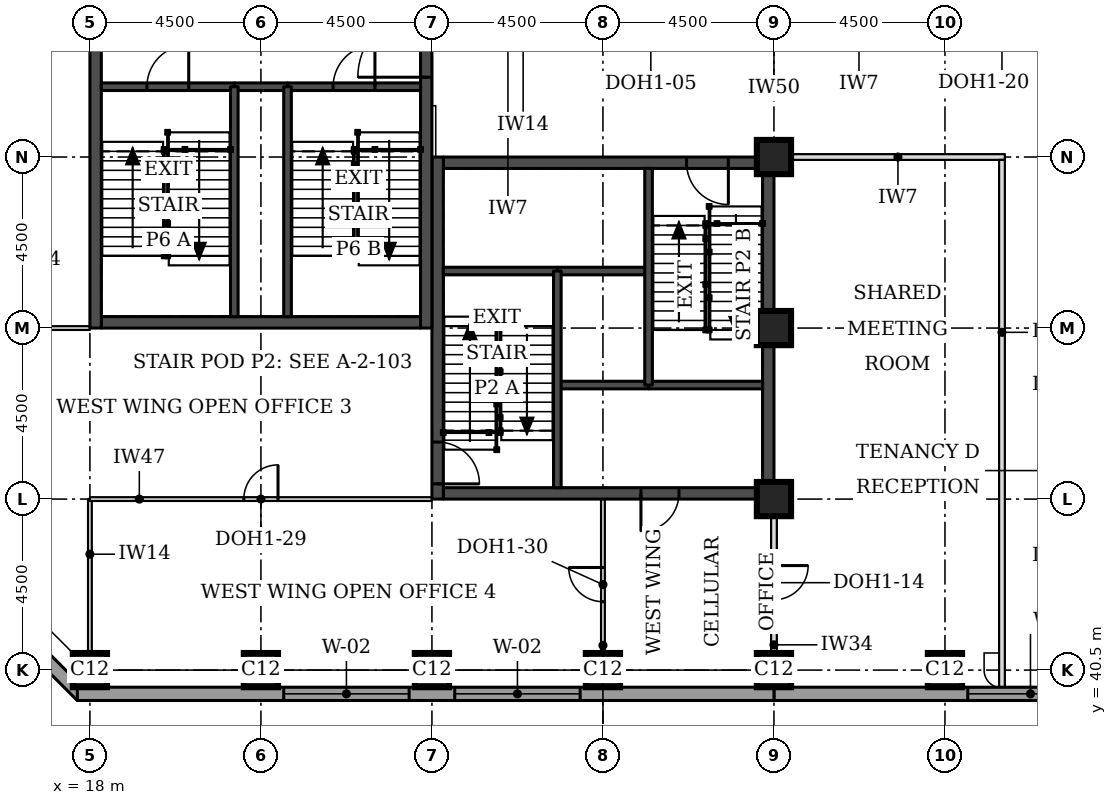
"""IFC4 building model, lengths in metres.
Left out: names, types, materials, properties, quantities, classifications, styles, units other than length and angle.
Written with IfcOpenShell. Run it as: python <this file> out.ifc"""

import sys

from ifc_helpers import new_model, si_unit, direction, frame, frame_2d, origin, origin_2d, place, context, subcontext, project, spatial, rectangle, extrude, element, fill, save


model = new_model("IFC4")
c1 = context("Model", 3, precision=1e-05, world=origin(), true_north=direction((0.0, 1.0)))
c2 = subcontext(c1, "Body", "Model", "MODEL_VIEW")
j1 = project(units=[si_unit("LENGTHUNIT", "METRE"), si_unit("PLANEANGLEUNIT", "RADIAN")], contexts=[c1])
p1 = place(None, origin())
s1 = spatial("IfcSite", under=j1, at=p1, CompositionType="ELEMENT")
p2 = place(p1, origin())
s2 = spatial("IfcBuilding", under=s1, at=p2, CompositionType="ELEMENT")
p3 = place(p2, frame((0.0, 0.0, 147.7)))
s3 = spatial("IfcBuildingStorey", under=s2, at=p3, CompositionType="ELEMENT", Elevation=147.7)
for number, where, z_axis, x_axis in (
    (1, (18.0, 40.5, 0.0), (0.0, 0.0, 1.0), (1.0, 0.0, 0.0)),
    (2, (22.5, 40.5, 0.0), (0.0, 0.0, 1.0), (1.0, 0.0, 0.0)),
    (3, (27.0, 40.5, 0.0), (0.0, 0.0, 1.0), (1.0, 0.0, 0.0)),
    (4, (31.5, 40.5, 0.0), (0.0, 0.0, 1.0), (1.0, 0.0, 0.0)),
    (5, (36.0, 40.5, 0.0), (0.0, 0.0, 1.0), (1.0, 0.0, 0.0)),
    (6, (40.5, 40.5, 0.0), (0.0, 0.0, 1.0), (1.0, 0.0, 0.0)),
    (7, (36.0, 45.0, 0.0), (0.0, 0.0, 1.0), (1.0, 0.0, 0.0)),
    (8, (36.0, 49.5, 0.0), (0.0, 0.0, 1.0), (1.0, 0.0, 0.0)),
    (9, (36.0, 54.0, 0.0), (0.0, 0.0, 1.0), (1.0, 0.0, 0.0)),
):
    element("IfcColumn", number, at=place(p3, frame(where, z_axis=z_axis, x_axis=x_axis)), inside=s3, PredefinedType="COLUMN", context=c2, shape_type="SweptSolid", body=[
        extrude(rectangle(XDim=0.9, YDim=0.9, at=origin_2d()), origin(), (0.0, 0.0, 1.0), 3.7),
    ])
p4 = place(p3, frame((27.3, 45.15, 0.0), z_axis=(0.0, 0.0, 1.0), x_axis=(1.0, 0.0, 0.0)))
e10 = element("IfcWall", 10, at=p4, inside=s3, PredefinedType="SHEAR", context=c2, shape_type="SweptSolid", body=[
    extrude(rectangle(XDim=8.4, YDim=0.3, at=frame_2d((4.2, 0.0))), origin(), (0.0, 0.0, 1.0), 3.7),
])
p5 = place(p4, frame((5.2, 0.0, 0.0)))
e11 = element("IfcOpeningElement", 11, at=p5, cuts=e10, PredefinedType="OPENING", context=c2, shape_type="SweptSolid", body=[
    extrude(rectangle(XDim=1.0, YDim=2.1, at=frame_2d((0.5, 1.05))), frame((0.0, 0.16, 0.0), z_axis=(0.0, -1.0, 0.0), x_axis=(1.0, 0.0, 0.0)), (0.0, 0.0, 1.0), 0.32),
])
p6 = place(p3, frame((27.3, 53.85, 0.0), z_axis=(0.0, 0.0, 1.0), x_axis=(1.0, 0.0, 0.0)))
e12 = element("IfcWall", 12, at=p6, inside=s3, PredefinedType="SHEAR", context=c2, shape_type="SweptSolid", body=[
    extrude(rectangle(XDim=8.4, YDim=0.3, at=frame_2d((4.2, 0.0))), origin(), (0.0, 0.0, 1.0), 3.7),
])
p7 = place(p6, frame((6.4, 0.0, 0.0)))
e13 = element("IfcOpeningElement", 13, at=p7, cuts=e12, PredefinedType="OPENING", context=c2, shape_type="SweptSolid", body=[
    extrude(rectangle(XDim=1.1, YDim=2.1, at=frame_2d((0.55, 1.05))), frame((0.0, 0.16, 0.0), z_axis=(0.0, -1.0, 0.0), x_axis=(1.0, 0.0, 0.0)), (0.0, 0.0, 1.0), 0.32),
])
p8 = place(p3, frame((27.15, 45.0, 0.0), z_axis=(0.0, 0.0, 1.0), x_axis=(0.0, 1.0, 0.0)))
e14 = element("IfcWall", 14, at=p8, inside=s3, PredefinedType="SHEAR", context=c2, shape_type="SweptSolid", body=[
    extrude(rectangle(XDim=9.0, YDim=0.3, at=frame_2d((4.5, 0.0))), origin(), (0.0, 0.0, 1.0), 3.7),
])
p9 = place(p8, frame((0.4, 0.0, 0.0)))
e15 = element("IfcOpeningElement", 15, at=p9, cuts=e14, PredefinedType="OPENING", context=c2, shape_type="SweptSolid", body=[
    extrude(rectangle(XDim=1.1, YDim=2.1, at=frame_2d((0.55, 1.05))), frame((0.0, 0.16, 0.0), z_axis=(0.0, -1.0, 0.0), x_axis=(1.0, 0.0, 0.0)), (0.0, 0.0, 1.0), 0.32),
])
p10 = place(p3, frame((35.85, 45.0, 0.0), z_axis=(0.0, 0.0, 1.0), x_axis=(0.0, 1.0, 0.0)))
e16 = element("IfcWall", 16, at=p10, inside=s3, PredefinedType="SHEAR", context=c2, shape_type="SweptSolid", body=[
    extrude(rectangle(XDim=9.0, YDim=0.3, at=frame_2d((4.5, 0.0))), origin(), (0.0, 0.0, 1.0), 3.7),
])
p11 = place(p3, frame((18.3, 49.65, 0.0), z_axis=(0.0, 0.0, 1.0), x_axis=(1.0, 0.0, 0.0)))
e17 = element("IfcWall", 17, at=p11, inside=s3, PredefinedType="SHEAR", context=c2, shape_type="SweptSolid", body=[
    extrude(rectangle(XDim=8.4, YDim=0.3, at=frame_2d((4.2, 0.0))), origin(), (0.0, 0.0, 1.0), 3.7),
])
p12 = place(p3, frame((18.15, 49.5, 0.0), z_axis=(0.0, 0.0, 1.0), x_axis=(0.0, 1.0, 0.0)))
e18 = element("IfcWall", 18, at=p12, inside=s3, PredefinedType="SHEAR", context=c2, shape_type="SweptSolid", body=[
    extrude(rectangle(XDim=9.0, YDim=0.3, at=frame_2d((4.5, 0.0))), origin(), (0.0, 0.0, 1.0), 3.7),
])
p13 = place(p3, frame((26.85, 49.5, 0.0), z_axis=(0.0, 0.0, 1.0), x_axis=(0.0, 1.0, 0.0)))
e19 = element("IfcWall", 19, at=p13, inside=s3, PredefinedType="SHEAR", context=c2, shape_type="SweptSolid", body=[
    extrude(rectangle(XDim=9.0, YDim=0.3, at=frame_2d((4.5, 0.0))), origin(), (0.0, 0.0, 1.0), 3.7),
])
p14 = place(p13, frame((6.6, 0.0, 0.0)))
e20 = element("IfcOpeningElement", 20, at=p14, cuts=e19, PredefinedType="OPENING", context=c2, shape_type="SweptSolid", body=[
    extrude(rectangle(XDim=1.8, YDim=2.1, at=frame_2d((0.9, 1.05))), frame((0.0, 0.16, 0.0), z_axis=(0.0, -1.0, 0.0), x_axis=(1.0, 0.0, 0.0)), (0.0, 0.0, 1.0), 0.32),
])
p15 = place(p3, frame((36.0, 39.875, 0.0), z_axis=(0.0, 0.0, 1.0), x_axis=(1.0, 0.0, 0.0)))
e21 = element("IfcWall", 21, at=p15, inside=s3, PredefinedType="STANDARD", context=c2, shape_type="SweptSolid", body=[
    extrude(rectangle(XDim=36.331, YDim=0.35, at=frame_2d((18.166, 0.0))), origin(), (0.0, 0.0, 1.0), 3.525),
])
p16 = place(p15, frame((5.1, 0.0, 0.9)))
e22 = element("IfcOpeningElement", 22, at=p16, cuts=e21, PredefinedType="OPENING", context=c2, shape_type="SweptSolid", body=[
    extrude(rectangle(XDim=3.3, YDim=1.9, at=frame_2d((1.65, 0.95))), frame((0.0, 0.185, 0.0), z_axis=(0.0, -1.0, 0.0), x_axis=(1.0, 0.0, 0.0)), (0.0, 0.0, 1.0), 0.37),
])
p17 = place(p15, frame((9.6, 0.0, 0.9)))
e23 = element("IfcOpeningElement", 23, at=p17, cuts=e21, PredefinedType="OPENING", context=c2, shape_type="SweptSolid", body=[
    extrude(rectangle(XDim=3.3, YDim=1.9, at=frame_2d((1.65, 0.95))), frame((0.0, 0.185, 0.0), z_axis=(0.0, -1.0, 0.0), x_axis=(1.0, 0.0, 0.0)), (0.0, 0.0, 1.0), 0.37),
])
p18 = place(p15, frame((14.1, 0.0, 0.9)))
e24 = element("IfcOpeningElement", 24, at=p18, cuts=e21, PredefinedType="OPENING", context=c2, shape_type="SweptSolid", body=[
    extrude(rectangle(XDim=3.3, YDim=1.9, at=frame_2d((1.65, 0.95))), frame((0.0, 0.185, 0.0), z_axis=(0.0, -1.0, 0.0), x_axis=(1.0, 0.0, 0.0)), (0.0, 0.0, 1.0), 0.37),
])
p19 = place(p15, frame((18.6, 0.0, 0.9)))
e25 = element("IfcOpeningElement", 25, at=p19, cuts=e21, PredefinedType="OPENING", context=c2, shape_type="SweptSolid", body=[
    extrude(rectangle(XDim=3.3, YDim=1.9, at=frame_2d((1.65, 0.95))), frame((0.0, 0.185, 0.0), z_axis=(0.0, -1.0, 0.0), x_axis=(1.0, 0.0, 0.0)), (0.0, 0.0, 1.0), 0.37),
])
p20 = place(p15, frame((23.1, 0.0, 0.9)))
e26 = element("IfcOpeningElement", 26, at=p20, cuts=e21, PredefinedType="OPENING", context=c2, shape_type="SweptSolid", body=[
    extrude(rectangle(XDim=3.3, YDim=1.9, at=frame_2d((1.65, 0.95))), frame((0.0, 0.185, 0.0), z_axis=(0.0, -1.0, 0.0), x_axis=(1.0, 0.0, 0.0)), (0.0, 0.0, 1.0), 0.37),
])
p21 = place(p15, frame((27.6, 0.0, 0.9)))
e27 = element("IfcOpeningElement", 27, at=p21, cuts=e21, PredefinedType="OPENING", context=c2, shape_type="SweptSolid", body=[
    extrude(rectangle(XDim=3.3, YDim=1.9, at=frame_2d((1.65, 0.95))), frame((0.0, 0.185, 0.0), z_axis=(0.0, -1.0, 0.0), x_axis=(1.0, 0.0, 0.0)), (0.0, 0.0, 1.0), 0.37),
])
p22 = place(p3, frame((12.824, 44.792, 0.0), z_axis=(0.0, 0.0, 1.0), x_axis=(0.707106781187, -0.707106781187, 0.0)))
e28 = element("IfcWall", 28, at=p22, inside=s3, PredefinedType="STANDARD", context=c2, shape_type="SweptSolid", body=[
    extrude(rectangle(XDim=7.027, YDim=0.35, at=frame_2d((3.513, 0.0))), origin(), (0.0, 0.0, 1.0), 3.525),
])
p23 = place(p22, frame((1.863, 0.0, 0.9)))
e29 = element("IfcOpeningElement", 29, at=p23, cuts=e28, PredefinedType="OPENING", context=c2, shape_type="SweptSolid", body=[
    extrude(rectangle(XDim=3.3, YDim=1.9, at=frame_2d((1.65, 0.95))), frame((0.0, 0.185, 0.0), z_axis=(0.0, -1.0, 0.0), x_axis=(1.0, 0.0, 0.0)), (0.0, 0.0, 1.0), 0.37),
])
p24 = place(p3, frame((17.669, 39.875, 0.0), z_axis=(0.0, 0.0, 1.0), x_axis=(1.0, 0.0, 0.0)))
e30 = element("IfcWall", 30, at=p24, inside=s3, PredefinedType="STANDARD", context=c2, shape_type="SweptSolid", body=[
    extrude(rectangle(XDim=18.331, YDim=0.35, at=frame_2d((9.166, 0.0))), origin(), (0.0, 0.0, 1.0), 3.525),
])
p25 = place(p24, frame((5.431, 0.0, 0.9)))
e31 = element("IfcOpeningElement", 31, at=p25, cuts=e30, PredefinedType="OPENING", context=c2, shape_type="SweptSolid", body=[
    extrude(rectangle(XDim=3.3, YDim=1.9, at=frame_2d((1.65, 0.95))), frame((0.0, 0.185, 0.0), z_axis=(0.0, -1.0, 0.0), x_axis=(1.0, 0.0, 0.0)), (0.0, 0.0, 1.0), 0.37),
])
p26 = place(p24, frame((9.931, 0.0, 0.9)))
e32 = element("IfcOpeningElement", 32, at=p26, cuts=e30, PredefinedType="OPENING", context=c2, shape_type="SweptSolid", body=[
    extrude(rectangle(XDim=3.3, YDim=1.9, at=frame_2d((1.65, 0.95))), frame((0.0, 0.185, 0.0), z_axis=(0.0, -1.0, 0.0), x_axis=(1.0, 0.0, 0.0)), (0.0, 0.0, 1.0), 0.37),
])
p27 = place(p3, frame((36.45, 54.0, 0.0), z_axis=(0.0, 0.0, 1.0), x_axis=(1.0, 0.0, 0.0)))
e33 = element("IfcWall", 33, at=p27, inside=s3, PredefinedType="PARTITIONING", context=c2, shape_type="SweptSolid", body=[
    extrude(rectangle(XDim=5.625, YDim=0.15, at=frame_2d((2.812, 0.0))), origin(), (0.0, 0.0, 1.0), 3.55),
])
p28 = place(p3, frame((42.0, 40.05, 0.0), z_axis=(0.0, 0.0, 1.0), x_axis=(0.0, 1.0, 0.0)))
e34 = element("IfcWall", 34, at=p28, inside=s3, PredefinedType="PARTITIONING", context=c2, shape_type="SweptSolid", body=[
    extrude(rectangle(XDim=13.875, YDim=0.15, at=frame_2d((6.938, 0.0))), origin(), (0.0, 0.0, 1.0), 3.55),
])
p29 = place(p3, frame((36.0, 40.95, 0.0), z_axis=(0.0, 0.0, 1.0), x_axis=(0.0, 1.0, 0.0)))
e35 = element("IfcWall", 35, at=p29, inside=s3, PredefinedType="PARTITIONING", context=c2, shape_type="SweptSolid", body=[
    extrude(rectangle(XDim=3.63, YDim=0.15, at=frame_2d((1.815, 0.0))), origin(), (0.0, 0.0, 1.0), 2.8),
])
p30 = place(p29, frame((1.4, 0.0, 0.0)))
e36 = element("IfcOpeningElement", 36, at=p30, cuts=e35, PredefinedType="OPENING", context=c2, shape_type="SweptSolid", body=[
    extrude(rectangle(XDim=0.9, YDim=2.1, at=frame_2d((0.45, 1.05))), frame((0.0, 0.085, 0.0), z_axis=(0.0, -1.0, 0.0), x_axis=(1.0, 0.0, 0.0)), (0.0, 0.0, 1.0), 0.17),
])
p31 = place(p3, frame((13.5, 49.5, 0.0), z_axis=(0.0, 0.0, 1.0), x_axis=(1.0, 0.0, 0.0)))
e37 = element("IfcWall", 37, at=p31, inside=s3, PredefinedType="PARTITIONING", context=c2, shape_type="SweptSolid", body=[
    extrude(rectangle(XDim=4.5, YDim=0.1, at=frame_2d((2.25, 0.0))), origin(), (0.0, 0.0, 1.0), 3.55),
])
p32 = place(p31, frame((1.8, 0.0, 0.0)))
e38 = element("IfcOpeningElement", 38, at=p32, cuts=e37, PredefinedType="OPENING", context=c2, shape_type="SweptSolid", body=[
    extrude(rectangle(XDim=0.9, YDim=2.1, at=frame_2d((0.45, 1.05))), frame((0.0, 0.06, 0.0), z_axis=(0.0, -1.0, 0.0), x_axis=(1.0, 0.0, 0.0)), (0.0, 0.0, 1.0), 0.12),
])
p33 = place(p3, frame((18.0, 40.5, 0.0), z_axis=(0.0, 0.0, 1.0), x_axis=(0.0, 1.0, 0.0)))
e39 = element("IfcWall", 39, at=p33, inside=s3, PredefinedType="PARTITIONING", context=c2, shape_type="SweptSolid", body=[
    extrude(rectangle(XDim=4.5, YDim=0.1, at=frame_2d((2.25, 0.0))), origin(), (0.0, 0.0, 1.0), 3.55),
])
p34 = place(p3, frame((18.0, 45.0, 0.0), z_axis=(0.0, 0.0, 1.0), x_axis=(1.0, 0.0, 0.0)))
e40 = element("IfcWall", 40, at=p34, inside=s3, PredefinedType="PARTITIONING", context=c2, shape_type="SweptSolid", body=[
    extrude(rectangle(XDim=9.0, YDim=0.1, at=frame_2d((4.5, 0.0))), origin(), (0.0, 0.0, 1.0), 2.55),
])
p35 = place(p34, frame((4.05, 0.0, 0.0)))
e41 = element("IfcOpeningElement", 41, at=p35, cuts=e40, PredefinedType="OPENING", context=c2, shape_type="SweptSolid", body=[
    extrude(rectangle(XDim=0.9, YDim=2.1, at=frame_2d((0.45, 1.05))), frame((0.0, 0.06, 0.0), z_axis=(0.0, -1.0, 0.0), x_axis=(1.0, 0.0, 0.0)), (0.0, 0.0, 1.0), 0.12),
])
p36 = place(p3, frame((31.5, 45.0, 0.0), z_axis=(0.0, 0.0, 1.0), x_axis=(0.0, -1.0, 0.0)))
e42 = element("IfcWall", 42, at=p36, inside=s3, PredefinedType="PARTITIONING", context=c2, shape_type="SweptSolid", body=[
    extrude(rectangle(XDim=4.5, YDim=0.1, at=frame_2d((2.25, 0.0))), origin(), (0.0, 0.0, 1.0), 3.55),
])
p37 = place(p36, frame((1.8, 0.0, 0.0)))
e43 = element("IfcOpeningElement", 43, at=p37, cuts=e42, PredefinedType="OPENING", context=c2, shape_type="SweptSolid", body=[
    extrude(rectangle(XDim=0.9, YDim=2.1, at=frame_2d((0.45, 1.05))), frame((0.0, 0.06, 0.0), z_axis=(0.0, -1.0, 0.0), x_axis=(1.0, 0.0, 0.0)), (0.0, 0.0, 1.0), 0.12),
])
p38 = place(p3, frame((30.3, 48.0, 0.0), z_axis=(0.0, 0.0, 1.0), x_axis=(1.0, 0.0, 0.0)))
e44 = element("IfcWall", 44, at=p38, inside=s3, PredefinedType="SOLIDWALL", context=c2, shape_type="SweptSolid", body=[
    extrude(rectangle(XDim=2.4, YDim=0.2, at=frame_2d((1.2, 0.0))), origin(), (0.0, 0.0, 1.0), 3.55),
])
p39 = place(p3, frame((32.7, 48.0, 0.0), z_axis=(0.0, 0.0, 1.0), x_axis=(1.0, 0.0, 0.0)))
e45 = element("IfcWall", 45, at=p39, inside=s3, PredefinedType="SOLIDWALL", context=c2, shape_type="SweptSolid", body=[
    extrude(rectangle(XDim=3.0, YDim=0.2, at=frame_2d((1.5, 0.0))), origin(), (0.0, 0.0, 1.0), 3.55),
])
p40 = place(p3, frame((30.3, 51.0, 0.0), z_axis=(0.0, 0.0, 1.0), x_axis=(1.0, 0.0, 0.0)))
e46 = element("IfcWall", 46, at=p40, inside=s3, PredefinedType="SOLIDWALL", context=c2, shape_type="SweptSolid", body=[
    extrude(rectangle(XDim=2.4, YDim=0.2, at=frame_2d((1.2, 0.0))), origin(), (0.0, 0.0, 1.0), 3.7),
])
p41 = place(p3, frame((27.3, 51.0, 0.0), z_axis=(0.0, 0.0, 1.0), x_axis=(1.0, 0.0, 0.0)))
e47 = element("IfcWall", 47, at=p41, inside=s3, PredefinedType="SOLIDWALL", context=c2, shape_type="SweptSolid", body=[
    extrude(rectangle(XDim=3.0, YDim=0.2, at=frame_2d((1.5, 0.0))), origin(), (0.0, 0.0, 1.0), 3.55),
])
for number, where, z_axis, x_axis in (
    (48, (30.3, 45.3, 0.0), (0.0, 0.0, 1.0), (0.0, 1.0, 0.0)),
    (49, (32.7, 48.0, 0.0), (0.0, 0.0, 1.0), (0.0, 1.0, 0.0)),
):
    element("IfcWall", number, at=place(p3, frame(where, z_axis=z_axis, x_axis=x_axis)), inside=s3, PredefinedType="SOLIDWALL", context=c2, shape_type="SweptSolid", body=[
        extrude(rectangle(XDim=5.7, YDim=0.2, at=frame_2d((2.85, 0.0))), origin(), (0.0, 0.0, 1.0), 3.55),
    ])
p42 = place(p3, frame((21.8, 55.85, 0.0), z_axis=(0.0, 0.0, 1.0), x_axis=(1.0, 0.0, 0.0)))
e50 = element("IfcWall", 50, at=p42, inside=s3, PredefinedType="SOLIDWALL", context=c2, shape_type="SweptSolid", body=[
    extrude(rectangle(XDim=1.4, YDim=0.2, at=frame_2d((0.7, 0.0))), origin(), (0.0, 0.0, 1.0), 3.55),
])
p43 = place(p3, frame((18.3, 55.85, 0.0), z_axis=(0.0, 0.0, 1.0), x_axis=(1.0, 0.0, 0.0)))
e51 = element("IfcWall", 51, at=p43, inside=s3, PredefinedType="SOLIDWALL", context=c2, shape_type="SweptSolid", body=[
    extrude(rectangle(XDim=3.5, YDim=0.2, at=frame_2d((1.75, 0.0))), origin(), (0.0, 0.0, 1.0), 3.55),
])
p44 = place(p43, frame((1.2, 0.0, 0.0)))
e52 = element("IfcOpeningElement", 52, at=p44, cuts=e51, PredefinedType="OPENING", context=c2, shape_type="SweptSolid", body=[
    extrude(rectangle(XDim=1.1, YDim=2.1, at=frame_2d((0.55, 1.05))), frame((0.0, 0.11, 0.0), z_axis=(0.0, -1.0, 0.0), x_axis=(1.0, 0.0, 0.0)), (0.0, 0.0, 1.0), 0.22),
])
p45 = place(p3, frame((23.2, 55.85, 0.0), z_axis=(0.0, 0.0, 1.0), x_axis=(1.0, 0.0, 0.0)))
e53 = element("IfcWall", 53, at=p45, inside=s3, PredefinedType="SOLIDWALL", context=c2, shape_type="SweptSolid", body=[
    extrude(rectangle(XDim=3.5, YDim=0.2, at=frame_2d((1.75, 0.0))), origin(), (0.0, 0.0, 1.0), 3.55),
])
p46 = place(p45, frame((1.2, 0.0, 0.0)))
e54 = element("IfcOpeningElement", 54, at=p46, cuts=e53, PredefinedType="OPENING", context=c2, shape_type="SweptSolid", body=[
    extrude(rectangle(XDim=1.1, YDim=2.1, at=frame_2d((0.55, 1.05))), frame((0.0, 0.11, 0.0), z_axis=(0.0, -1.0, 0.0), x_axis=(1.0, 0.0, 0.0)), (0.0, 0.0, 1.0), 0.22),
])
for number, where, z_axis, x_axis in (
    (55, (21.8, 49.8, 0.0), (0.0, 0.0, 1.0), (0.0, 1.0, 0.0)),
    (56, (23.2, 49.8, 0.0), (0.0, 0.0, 1.0), (0.0, 1.0, 0.0)),
):
    element("IfcWall", number, at=place(p3, frame(where, z_axis=z_axis, x_axis=x_axis)), inside=s3, PredefinedType="SOLIDWALL", context=c2, shape_type="SweptSolid", body=[
        extrude(rectangle(XDim=6.05, YDim=0.2, at=frame_2d((3.025, 0.0))), origin(), (0.0, 0.0, 1.0), 3.55),
    ])
p47 = place(p16, origin())
e57 = element("IfcWindow", 57, at=p47, inside=s3, PartitioningType="SINGLE_PANEL", PredefinedType="WINDOW", context=c2, shape_type="SweptSolid", body=[
    extrude(rectangle(XDim=3.3, YDim=1.9, at=frame_2d((1.65, 0.95))), frame((0.0, 0.085, 0.0), z_axis=(0.0, -1.0, 0.0), x_axis=(1.0, 0.0, 0.0)), (0.0, 0.0, 1.0), 0.06),
])
fill(e22, e57)
p48 = place(p25, origin())
e58 = element("IfcWindow", 58, at=p48, inside=s3, PartitioningType="SINGLE_PANEL", PredefinedType="WINDOW", context=c2, shape_type="SweptSolid", body=[
    extrude(rectangle(XDim=3.3, YDim=1.9, at=frame_2d((1.65, 0.95))), frame((0.0, 0.085, 0.0), z_axis=(0.0, -1.0, 0.0), x_axis=(1.0, 0.0, 0.0)), (0.0, 0.0, 1.0), 0.06),
])
fill(e31, e58)
p49 = place(p26, origin())
e59 = element("IfcWindow", 59, at=p49, inside=s3, PartitioningType="SINGLE_PANEL", PredefinedType="WINDOW", context=c2, shape_type="SweptSolid", body=[
    extrude(rectangle(XDim=3.3, YDim=1.9, at=frame_2d((1.65, 0.95))), frame((0.0, 0.085, 0.0), z_axis=(0.0, -1.0, 0.0), x_axis=(1.0, 0.0, 0.0)), (0.0, 0.0, 1.0), 0.06),
])
fill(e32, e59)
p50 = place(p30, frame((0.9, 0.0, 0.0), z_axis=(0.0, 0.0, 1.0), x_axis=(-1.0, 0.0, 0.0)))
e60 = element("IfcDoor", 60, at=p50, inside=s3, OperationType="SINGLE_SWING_LEFT", PredefinedType="DOOR", context=c2, shape_type="SweptSolid", body=[
    extrude(rectangle(XDim=0.9, YDim=2.1, at=frame_2d((0.45, 1.05))), frame((0.0, 0.025, 0.0), z_axis=(0.0, -1.0, 0.0), x_axis=(1.0, 0.0, 0.0)), (0.0, 0.0, 1.0), 0.05),
])
fill(e36, e60)
p51 = place(p35, origin())
e61 = element("IfcDoor", 61, at=p51, inside=s3, OperationType="SINGLE_SWING_RIGHT", PredefinedType="DOOR", context=c2, shape_type="SweptSolid", body=[
    extrude(rectangle(XDim=0.9, YDim=2.1, at=frame_2d((0.45, 1.05))), frame((0.0, 0.025, 0.0), z_axis=(0.0, -1.0, 0.0), x_axis=(1.0, 0.0, 0.0)), (0.0, 0.0, 1.0), 0.05),
])
fill(e41, e61)
p52 = place(p37, frame((0.9, 0.0, 0.0), z_axis=(0.0, 0.0, 1.0), x_axis=(-1.0, 0.0, 0.0)))
e62 = element("IfcDoor", 62, at=p52, inside=s3, OperationType="SINGLE_SWING_RIGHT", PredefinedType="DOOR", context=c2, shape_type="SweptSolid", body=[
    extrude(rectangle(XDim=0.9, YDim=2.1, at=frame_2d((0.45, 1.05))), frame((0.0, 0.025, 0.0), z_axis=(0.0, -1.0, 0.0), x_axis=(1.0, 0.0, 0.0)), (0.0, 0.0, 1.0), 0.05),
])
fill(e43, e62)
p53 = place(p9, frame((1.1, 0.0, 0.0), z_axis=(0.0, 0.0, 1.0), x_axis=(-1.0, 0.0, 0.0)))
e63 = element("IfcDoor", 63, at=p53, inside=s3, OperationType="SINGLE_SWING_RIGHT", PredefinedType="DOOR", context=c2, shape_type="SweptSolid", body=[
    extrude(rectangle(XDim=1.1, YDim=2.1, at=frame_2d((0.55, 1.05))), frame((0.0, 0.025, 0.0), z_axis=(0.0, -1.0, 0.0), x_axis=(1.0, 0.0, 0.0)), (0.0, 0.0, 1.0), 0.05),
])
fill(e15, e63)
p54 = place(p7, frame((1.1, 0.0, 0.0), z_axis=(0.0, 0.0, 1.0), x_axis=(-1.0, 0.0, 0.0)))
e64 = element("IfcDoor", 64, at=p54, inside=s3, OperationType="SINGLE_SWING_LEFT", PredefinedType="DOOR", context=c2, shape_type="SweptSolid", body=[
    extrude(rectangle(XDim=1.1, YDim=2.1, at=frame_2d((0.55, 1.05))), frame((0.0, 0.025, 0.0), z_axis=(0.0, -1.0, 0.0), x_axis=(1.0, 0.0, 0.0)), (0.0, 0.0, 1.0), 0.05),
])
fill(e13, e64)
p55 = place(p5, frame((1.0, 0.0, 0.0), z_axis=(0.0, 0.0, 1.0), x_axis=(-1.0, 0.0, 0.0)))
e65 = element("IfcDoor", 65, at=p55, inside=s3, OperationType="SINGLE_SWING_RIGHT", PredefinedType="DOOR", context=c2, shape_type="SweptSolid", body=[
    extrude(rectangle(XDim=1.0, YDim=2.1, at=frame_2d((0.5, 1.05))), frame((0.0, 0.025, 0.0), z_axis=(0.0, -1.0, 0.0), x_axis=(1.0, 0.0, 0.0)), (0.0, 0.0, 1.0), 0.05),
])
fill(e11, e65)
p56 = place(p44, origin())
e66 = element("IfcDoor", 66, at=p56, inside=s3, OperationType="SINGLE_SWING_RIGHT", PredefinedType="DOOR", context=c2, shape_type="SweptSolid", body=[
    extrude(rectangle(XDim=1.1, YDim=2.1, at=frame_2d((0.55, 1.05))), frame((0.0, 0.025, 0.0), z_axis=(0.0, -1.0, 0.0), x_axis=(1.0, 0.0, 0.0)), (0.0, 0.0, 1.0), 0.05),
])
fill(e52, e66)
p57 = place(p46, origin())
e67 = element("IfcDoor", 67, at=p57, inside=s3, OperationType="SINGLE_SWING_RIGHT", PredefinedType="DOOR", context=c2, shape_type="SweptSolid", body=[
    extrude(rectangle(XDim=1.1, YDim=2.1, at=frame_2d((0.55, 1.05))), frame((0.0, 0.025, 0.0), z_axis=(0.0, -1.0, 0.0), x_axis=(1.0, 0.0, 0.0)), (0.0, 0.0, 1.0), 0.05),
])
fill(e54, e67)
p58 = place(p14, origin())
e68 = element("IfcDoor", 68, at=p58, inside=s3, OperationType="SINGLE_SWING_LEFT", PredefinedType="DOOR", context=c2, shape_type="SweptSolid", body=[
    extrude(rectangle(XDim=1.8, YDim=2.1, at=frame_2d((0.9, 1.05))), frame((0.0, 0.025, 0.0), z_axis=(0.0, -1.0, 0.0), x_axis=(1.0, 0.0, 0.0)), (0.0, 0.0, 1.0), 0.05),
])
fill(e20, e68)
save(model, sys.argv[1])
